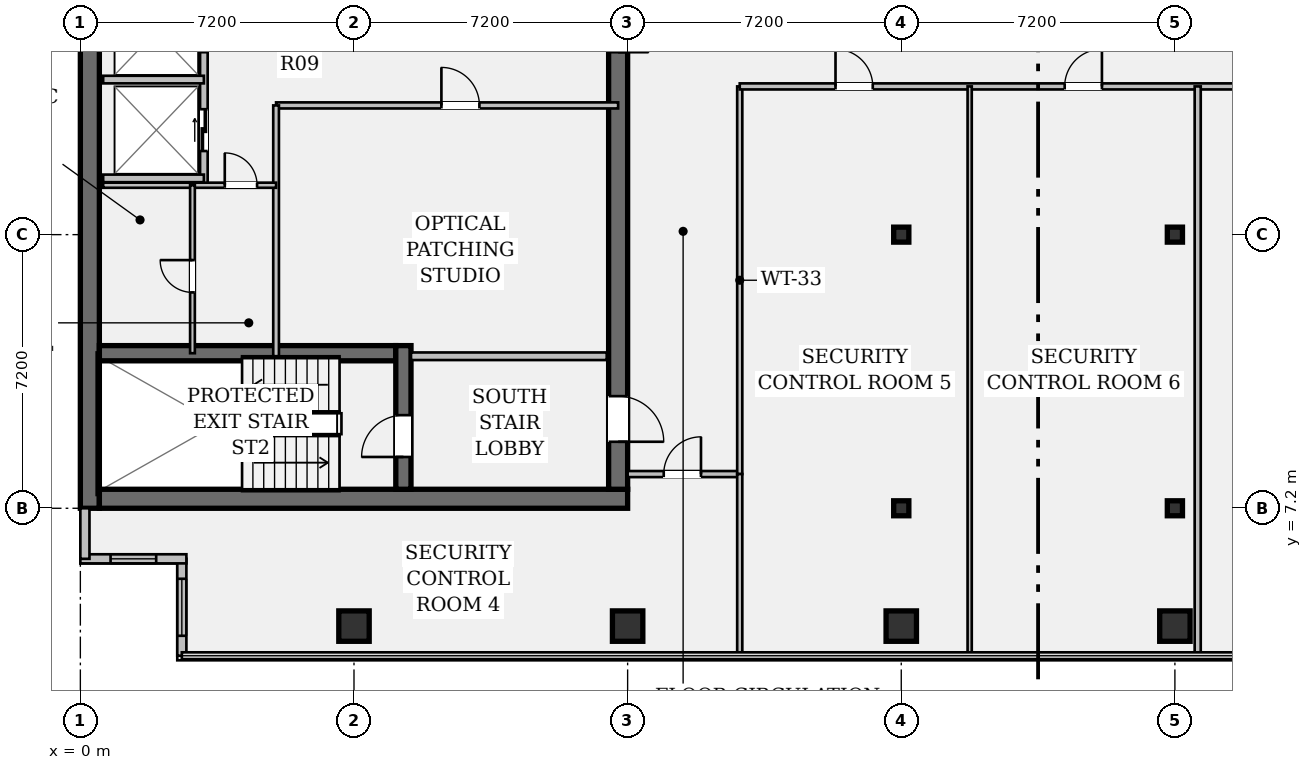
"""IFC4 building model, lengths in metres.
Left out: names, types, materials, properties, quantities, classifications, styles, units other than length and angle.
Written with IfcOpenShell. Run it as: python <this file> out.ifc"""

import sys

from ifc_helpers import new_model, si_unit, direction, frame, frame_2d, origin, origin_2d, place, context, subcontext, project, spatial, rectangle, hollow_rectangle, i_section, extrude, element, fill, save


model = new_model("IFC4")
c1 = context("Model", 3, precision=1e-05, world=origin(), true_north=direction((0.0, 1.0)))
c2 = subcontext(c1, "Body", "Model", "MODEL_VIEW")
j1 = project(units=[si_unit("LENGTHUNIT", "METRE"), si_unit("PLANEANGLEUNIT", "RADIAN")], contexts=[c1])
p1 = place(None, origin())
s1 = spatial("IfcSite", under=j1, at=p1, CompositionType="ELEMENT")
p2 = place(p1, origin())
s2 = spatial("IfcBuilding", under=s1, at=p2, CompositionType="ELEMENT")
p3 = place(p2, frame((0.0, 0.0, 190.75)))
s3 = spatial("IfcBuildingStorey", under=s2, at=p3, CompositionType="ELEMENT", Elevation=190.75)
p4 = place(p3, frame((0.25, 7.2, 0.0), z_axis=(0.0, 0.0, 1.0), x_axis=(0.0, 1.0, 0.0)))
e1 = element("IfcWall", 1, at=p4, inside=s3, PredefinedType="SHEAR", context=c2, shape_type="SweptSolid", body=[
    extrude(rectangle(XDim=28.8, YDim=0.5, at=frame_2d((14.4, 0.0))), origin(), (0.0, 0.0, 1.0), 3.24),
])
p5 = place(p3, frame((0.5, 7.45, 0.0), z_axis=(0.0, 0.0, 1.0), x_axis=(1.0, 0.0, 0.0)))
e2 = element("IfcWall", 2, at=p5, inside=s3, PredefinedType="SHEAR", context=c2, shape_type="SweptSolid", body=[
    extrude(rectangle(XDim=13.9, YDim=0.5, at=frame_2d((6.95, 0.0))), origin(), (0.0, 0.0, 1.0), 3.24),
])
p6 = place(p3, frame((14.15, 35.5, 0.0), z_axis=(0.0, 0.0, 1.0), x_axis=(0.0, -1.0, 0.0)))
e3 = element("IfcWall", 3, at=p6, inside=s3, PredefinedType="SHEAR", context=c2, shape_type="SweptSolid", body=[
    extrude(rectangle(XDim=27.8, YDim=0.5, at=frame_2d((13.9, 0.0))), origin(), (0.0, 0.0, 1.0), 3.24),
])
p7 = place(p6, frame((1.4, 0.0, 0.0)))
e4 = element("IfcOpeningElement", 4, at=p7, cuts=e3, PredefinedType="OPENING", context=c2, shape_type="SweptSolid", body=[
    extrude(rectangle(XDim=1.2, YDim=2.15, at=frame_2d((0.6, 1.075))), frame((0.0, 0.262, 0.0), z_axis=(0.0, -1.0, 0.0), x_axis=(1.0, 0.0, 0.0)), (0.0, 0.0, 1.0), 0.524),
])
p8 = place(p6, frame((25.35, 0.0, 0.0)))
e5 = element("IfcOpeningElement", 5, at=p8, cuts=e3, PredefinedType="OPENING", context=c2, shape_type="SweptSolid", body=[
    extrude(rectangle(XDim=1.2, YDim=2.15, at=frame_2d((0.6, 1.075))), frame((0.0, 0.262, 0.0), z_axis=(0.0, -1.0, 0.0), x_axis=(1.0, 0.0, 0.0)), (0.0, 0.0, 1.0), 0.524),
])
p9 = place(p6, frame((14.7, 0.0, 0.0)))
e6 = element("IfcOpeningElement", 6, at=p9, cuts=e3, PredefinedType="OPENING", context=c2, shape_type="SweptSolid", body=[
    extrude(rectangle(XDim=1.6, YDim=2.2, at=frame_2d((0.8, 1.1))), frame((0.0, 0.262, 0.0), z_axis=(0.0, -1.0, 0.0), x_axis=(1.0, 0.0, 0.0)), (0.0, 0.0, 1.0), 0.524),
])
p10 = place(p3, frame((0.5, 11.28, 0.0), z_axis=(0.0, 0.0, 1.0), x_axis=(1.0, 0.0, 0.0)))
e7 = element("IfcWall", 7, at=p10, inside=s3, PredefinedType="SHEAR", context=c2, shape_type="SweptSolid", body=[
    extrude(rectangle(XDim=7.8, YDim=0.4, at=frame_2d((3.9, 0.0))), origin(), (0.0, 0.0, 1.0), 3.24),
])
p11 = place(p3, frame((8.5, 7.7, 0.0), z_axis=(0.0, 0.0, 1.0), x_axis=(0.0, 1.0, 0.0)))
e8 = element("IfcWall", 8, at=p11, inside=s3, PredefinedType="SHEAR", context=c2, shape_type="SweptSolid", body=[
    extrude(rectangle(XDim=3.78, YDim=0.4, at=frame_2d((1.89, 0.0))), origin(), (0.0, 0.0, 1.0), 3.24),
])
p12 = place(p11, frame((0.85, 0.0, 0.0)))
e9 = element("IfcOpeningElement", 9, at=p12, cuts=e8, PredefinedType="OPENING", context=c2, shape_type="SweptSolid", body=[
    extrude(rectangle(XDim=1.1, YDim=2.15, at=frame_2d((0.55, 1.075))), frame((0.0, 0.212, 0.0), z_axis=(0.0, -1.0, 0.0), x_axis=(1.0, 0.0, 0.0)), (0.0, 0.0, 1.0), 0.424),
])
for number, where, z_axis, x_axis in (
    (10, (7.2, 4.1, 0.0), (0.0, 0.0, 1.0), (1.0, 0.0, 0.0)),
    (11, (14.4, 4.1, 0.0), (0.0, 0.0, 1.0), (1.0, 0.0, 0.0)),
    (12, (21.6, 4.1, 0.0), (0.0, 0.0, 1.0), (1.0, 0.0, 0.0)),
):
    element("IfcColumn", number, at=place(p3, frame(where, z_axis=z_axis, x_axis=x_axis)), inside=s3, PredefinedType="COLUMN", context=c2, shape_type="SweptSolid", body=[
        extrude(hollow_rectangle(XDim=0.8, YDim=0.8, WallThickness=0.05, at=origin_2d()), origin(), (0.0, 0.0, 1.0), 3.24),
    ])
for number, where, z_axis, x_axis in (
    (13, (21.6, 7.2, 0.0), (0.0, 0.0, 1.0), (1.0, 0.0, 0.0)),
    (14, (21.6, 14.4, 0.0), (0.0, 0.0, 1.0), (1.0, 0.0, 0.0)),
):
    element("IfcColumn", number, at=place(p3, frame(where, z_axis=z_axis, x_axis=x_axis)), inside=s3, PredefinedType="COLUMN", context=c2, shape_type="SweptSolid", body=[
        extrude(i_section(OverallWidth=0.399, OverallDepth=0.394, WebThickness=0.023, FlangeThickness=0.037, FilletRadius=0.018, at=origin_2d()), origin(), (0.0, 0.0, 1.0), 3.24),
    ])
p13 = place(p3, frame((28.8, 4.1, 0.0), z_axis=(0.0, 0.0, 1.0), x_axis=(1.0, 0.0, 0.0)))
e15 = element("IfcColumn", 15, at=p13, inside=s3, PredefinedType="COLUMN", context=c2, shape_type="SweptSolid", body=[
    extrude(hollow_rectangle(XDim=0.8, YDim=0.8, WallThickness=0.05, at=origin_2d()), origin(), (0.0, 0.0, 1.0), 3.24),
])
for number, where, z_axis, x_axis in (
    (16, (28.8, 7.2, 0.0), (0.0, 0.0, 1.0), (1.0, 0.0, 0.0)),
    (17, (28.8, 14.4, 0.0), (0.0, 0.0, 1.0), (1.0, 0.0, 0.0)),
):
    element("IfcColumn", number, at=place(p3, frame(where, z_axis=z_axis, x_axis=x_axis)), inside=s3, PredefinedType="COLUMN", context=c2, shape_type="SweptSolid", body=[
        extrude(i_section(OverallWidth=0.399, OverallDepth=0.394, WebThickness=0.023, FlangeThickness=0.037, FilletRadius=0.018, at=origin_2d()), origin(), (0.0, 0.0, 1.0), 3.24),
    ])
p14 = place(p3, frame((2.67, 3.32, 0.0), z_axis=(0.0, 0.0, 1.0), x_axis=(0.0, 1.0, 0.0)))
e18 = element("IfcWall", 18, at=p14, inside=s3, PredefinedType="STANDARD", context=c2, shape_type="SweptSolid", body=[
    extrude(rectangle(XDim=2.55, YDim=0.24, at=frame_2d((1.275, 0.0))), origin(), (0.0, 0.0, 1.0), 3.24),
])
p15 = place(p14, frame((0.525, 0.0, 0.95)))
e19 = element("IfcOpeningElement", 19, at=p15, cuts=e18, PredefinedType="OPENING", context=c2, shape_type="SweptSolid", body=[
    extrude(rectangle(XDim=1.5, YDim=1.8, at=frame_2d((0.75, 0.9))), frame((0.0, 0.132, 0.0), z_axis=(0.0, -1.0, 0.0), x_axis=(1.0, 0.0, 0.0)), (0.0, 0.0, 1.0), 0.264),
])
p16 = place(p3, frame((2.79, 5.87, 0.0), z_axis=(0.0, 0.0, 1.0), x_axis=(-1.0, 0.0, 0.0)))
e20 = element("IfcWall", 20, at=p16, inside=s3, PredefinedType="STANDARD", context=c2, shape_type="SweptSolid", body=[
    extrude(rectangle(XDim=2.79, YDim=0.24, at=frame_2d((1.395, 0.0))), origin(), (0.0, 0.0, 1.0), 3.24),
])
p17 = place(p16, frame((0.795, 0.0, 0.95)))
e21 = element("IfcOpeningElement", 21, at=p17, cuts=e20, PredefinedType="OPENING", context=c2, shape_type="SweptSolid", body=[
    extrude(rectangle(XDim=1.2, YDim=1.8, at=frame_2d((0.6, 0.9))), frame((0.0, 0.132, 0.0), z_axis=(0.0, -1.0, 0.0), x_axis=(1.0, 0.0, 0.0)), (0.0, 0.0, 1.0), 0.264),
])
p18 = place(p3, frame((0.12, 5.87, 0.0), z_axis=(0.0, 0.0, 1.0), x_axis=(0.0, 1.0, 0.0)))
e22 = element("IfcWall", 22, at=p18, inside=s3, PredefinedType="STANDARD", context=c2, shape_type="SweptSolid", body=[
    extrude(rectangle(XDim=1.33, YDim=0.24, at=frame_2d((0.665, 0.0))), origin(), (0.0, 0.0, 1.0), 3.24),
])
p19 = place(p3, frame((8.7, 11.2, 0.0), z_axis=(0.0, 0.0, 1.0), x_axis=(1.0, 0.0, 0.0)))
e23 = element("IfcWall", 23, at=p19, inside=s3, PredefinedType="PARTITIONING", context=c2, shape_type="SweptSolid", body=[
    extrude(rectangle(XDim=5.15, YDim=0.2, at=frame_2d((2.575, 0.0))), origin(), (0.0, 0.0, 1.0), 3.24),
])
p20 = place(p3, frame((3.25, 15.7, 0.0), z_axis=(0.0, 0.0, 1.0), x_axis=(0.0, 1.0, 0.0)))
e24 = element("IfcWall", 24, at=p20, inside=s3, PredefinedType="PARTITIONING", context=c2, shape_type="SweptSolid", body=[
    extrude(rectangle(XDim=13.08, YDim=0.2, at=frame_2d((6.54, 0.0))), origin(), (0.0, 0.0, 1.0), 3.24),
])
p21 = place(p20, frame((0.9, 0.0, 0.0)))
e25 = element("IfcOpeningElement", 25, at=p21, cuts=e24, PredefinedType="OPENING", context=c2, shape_type="SweptSolid", body=[
    extrude(rectangle(XDim=1.1, YDim=2.2, at=frame_2d((0.55, 1.1))), frame((0.0, 0.112, 0.0), z_axis=(0.0, -1.0, 0.0), x_axis=(1.0, 0.0, 0.0)), (0.0, 0.0, 1.0), 0.224),
])
p22 = place(p20, frame((3.5, 0.0, 0.0)))
e26 = element("IfcOpeningElement", 26, at=p22, cuts=e24, PredefinedType="OPENING", context=c2, shape_type="SweptSolid", body=[
    extrude(rectangle(XDim=1.1, YDim=2.2, at=frame_2d((0.55, 1.1))), frame((0.0, 0.112, 0.0), z_axis=(0.0, -1.0, 0.0), x_axis=(1.0, 0.0, 0.0)), (0.0, 0.0, 1.0), 0.224),
])
p23 = place(p20, frame((7.2, 0.0, 0.0)))
e27 = element("IfcOpeningElement", 27, at=p23, cuts=e24, PredefinedType="OPENING", context=c2, shape_type="SweptSolid", body=[
    extrude(rectangle(XDim=1.1, YDim=2.2, at=frame_2d((0.55, 1.1))), frame((0.0, 0.112, 0.0), z_axis=(0.0, -1.0, 0.0), x_axis=(1.0, 0.0, 0.0)), (0.0, 0.0, 1.0), 0.224),
])
p24 = place(p20, frame((9.8, 0.0, 0.0)))
e28 = element("IfcOpeningElement", 28, at=p24, cuts=e24, PredefinedType="OPENING", context=c2, shape_type="SweptSolid", body=[
    extrude(rectangle(XDim=1.1, YDim=2.2, at=frame_2d((0.55, 1.1))), frame((0.0, 0.112, 0.0), z_axis=(0.0, -1.0, 0.0), x_axis=(1.0, 0.0, 0.0)), (0.0, 0.0, 1.0), 0.224),
])
for number, where, z_axis, x_axis in (
    (29, (0.6, 15.88, 0.0), (0.0, 0.0, 1.0), (1.0, 0.0, 0.0)),
    (30, (0.6, 18.48, 0.0), (0.0, 0.0, 1.0), (1.0, 0.0, 0.0)),
):
    element("IfcWall", number, at=place(p3, frame(where, z_axis=z_axis, x_axis=x_axis)), inside=s3, PredefinedType="PARTITIONING", context=c2, shape_type="SweptSolid", body=[
        extrude(rectangle(XDim=2.65, YDim=0.2, at=frame_2d((1.325, 0.0))), origin(), (0.0, 0.0, 1.0), 3.24),
    ])
p25 = place(p3, frame((5.15, 17.8, 0.0), z_axis=(0.0, 0.0, 1.0), x_axis=(1.0, 0.0, 0.0)))
e31 = element("IfcWall", 31, at=p25, inside=s3, PredefinedType="PARTITIONING", context=c2, shape_type="SweptSolid", body=[
    extrude(rectangle(XDim=9.0, YDim=0.16, at=frame_2d((4.5, 0.0))), origin(), (0.0, 0.0, 1.0), 3.24),
])
p26 = place(p25, frame((4.35, 0.0, 0.0)))
e32 = element("IfcOpeningElement", 32, at=p26, cuts=e31, PredefinedType="OPENING", context=c2, shape_type="SweptSolid", body=[
    extrude(rectangle(XDim=1.0, YDim=2.15, at=frame_2d((0.5, 1.075))), frame((0.0, 0.092, 0.0), z_axis=(0.0, -1.0, 0.0), x_axis=(1.0, 0.0, 0.0)), (0.0, 0.0, 1.0), 0.184),
])
p27 = place(p3, frame((5.15, 11.2, 0.0), z_axis=(0.0, 0.0, 1.0), x_axis=(0.0, 1.0, 0.0)))
e33 = element("IfcWall", 33, at=p27, inside=s3, PredefinedType="PARTITIONING", context=c2, shape_type="SweptSolid", body=[
    extrude(rectangle(XDim=6.6, YDim=0.15, at=frame_2d((3.3, 0.0))), origin(), (0.0, 0.0, 1.0), 3.24),
])
p28 = place(p3, frame((0.6, 15.7, 0.0), z_axis=(0.0, 0.0, 1.0), x_axis=(1.0, 0.0, 0.0)))
e34 = element("IfcWall", 34, at=p28, inside=s3, PredefinedType="PARTITIONING", context=c2, shape_type="SweptSolid", body=[
    extrude(rectangle(XDim=4.55, YDim=0.135, at=frame_2d((2.275, 0.0))), origin(), (0.0, 0.0, 1.0), 3.24),
])
p29 = place(p28, frame((3.2, 0.0, 0.0)))
e35 = element("IfcOpeningElement", 35, at=p29, cuts=e34, PredefinedType="OPENING", context=c2, shape_type="SweptSolid", body=[
    extrude(rectangle(XDim=0.85, YDim=2.15, at=frame_2d((0.425, 1.075))), frame((0.0, 0.08, 0.0), z_axis=(0.0, -1.0, 0.0), x_axis=(1.0, 0.0, 0.0)), (0.0, 0.0, 1.0), 0.159),
])
p30 = place(p3, frame((2.95, 11.28, 0.0), z_axis=(0.0, 0.0, 1.0), x_axis=(0.0, 1.0, 0.0)))
e36 = element("IfcWall", 36, at=p30, inside=s3, PredefinedType="PARTITIONING", context=c2, shape_type="SweptSolid", body=[
    extrude(rectangle(XDim=4.42, YDim=0.125, at=frame_2d((2.21, 0.0))), origin(), (0.0, 0.0, 1.0), 3.24),
])
p31 = place(p30, frame((1.6, 0.0, 0.0)))
e37 = element("IfcOpeningElement", 37, at=p31, cuts=e36, PredefinedType="OPENING", context=c2, shape_type="SweptSolid", body=[
    extrude(rectangle(XDim=0.85, YDim=2.15, at=frame_2d((0.425, 1.075))), frame((0.0, 0.074, 0.0), z_axis=(0.0, -1.0, 0.0), x_axis=(1.0, 0.0, 0.0)), (0.0, 0.0, 1.0), 0.149),
])
p32 = place(p3, frame((14.4, 8.1, 0.0), z_axis=(0.0, 0.0, 1.0), x_axis=(1.0, 0.0, 0.0)))
e38 = element("IfcWall", 38, at=p32, inside=s3, PredefinedType="PARTITIONING", context=c2, shape_type="SweptSolid", body=[
    extrude(rectangle(XDim=2.95, YDim=0.16, at=frame_2d((1.475, 0.0))), origin(), (0.0, 0.0, 1.0), 2.808),
])
p33 = place(p32, frame((0.95, 0.0, 0.0)))
e39 = element("IfcOpeningElement", 39, at=p33, cuts=e38, PredefinedType="OPENING", context=c2, shape_type="SweptSolid", body=[
    extrude(rectangle(XDim=0.98, YDim=2.15, at=frame_2d((0.49, 1.075))), frame((0.0, 0.092, 0.0), z_axis=(0.0, -1.0, 0.0), x_axis=(1.0, 0.0, 0.0)), (0.0, 0.0, 1.0), 0.184),
])
p34 = place(p3, frame((17.35, 8.1, 0.0), z_axis=(0.0, 0.0, 1.0), x_axis=(0.0, 1.0, 0.0)))
e40 = element("IfcWall", 40, at=p34, inside=s3, PredefinedType="PARTITIONING", context=c2, shape_type="SweptSolid", body=[
    extrude(rectangle(XDim=10.2, YDim=0.135, at=frame_2d((5.1, 0.0))), origin(), (0.0, 0.0, 1.0), 2.603),
])
p35 = place(p3, frame((17.35, 18.3, 0.0), z_axis=(0.0, 0.0, 1.0), x_axis=(1.0, 0.0, 0.0)))
e41 = element("IfcWall", 41, at=p35, inside=s3, PredefinedType="PARTITIONING", context=c2, shape_type="SweptSolid", body=[
    extrude(rectangle(XDim=16.2, YDim=0.16, at=frame_2d((8.1, 0.0))), origin(), (0.0, 0.0, 1.0), 2.603),
])
p36 = place(p35, frame((2.52, 0.0, 0.0)))
e42 = element("IfcOpeningElement", 42, at=p36, cuts=e41, PredefinedType="OPENING", context=c2, shape_type="SweptSolid", body=[
    extrude(rectangle(XDim=0.98, YDim=2.15, at=frame_2d((0.49, 1.075))), frame((0.0, 0.092, 0.0), z_axis=(0.0, -1.0, 0.0), x_axis=(1.0, 0.0, 0.0)), (0.0, 0.0, 1.0), 0.184),
])
p37 = place(p35, frame((8.55, 0.0, 0.0)))
e43 = element("IfcOpeningElement", 43, at=p37, cuts=e41, PredefinedType="OPENING", context=c2, shape_type="SweptSolid", body=[
    extrude(rectangle(XDim=0.98, YDim=2.15, at=frame_2d((0.49, 1.075))), frame((0.0, 0.092, 0.0), z_axis=(0.0, -1.0, 0.0), x_axis=(1.0, 0.0, 0.0)), (0.0, 0.0, 1.0), 0.184),
])
p38 = place(p35, frame((13.62, 0.0, 0.0)))
e44 = element("IfcOpeningElement", 44, at=p38, cuts=e41, PredefinedType="OPENING", context=c2, shape_type="SweptSolid", body=[
    extrude(rectangle(XDim=0.98, YDim=2.15, at=frame_2d((0.49, 1.075))), frame((0.0, 0.092, 0.0), z_axis=(0.0, -1.0, 0.0), x_axis=(1.0, 0.0, 0.0)), (0.0, 0.0, 1.0), 0.184),
])
p39 = place(p3, frame((17.35, 3.32, 0.0), z_axis=(0.0, 0.0, 1.0), x_axis=(0.0, 1.0, 0.0)))
e45 = element("IfcWall", 45, at=p39, inside=s3, PredefinedType="PARTITIONING", context=c2, shape_type="SweptSolid", body=[
    extrude(rectangle(XDim=4.78, YDim=0.135, at=frame_2d((2.39, 0.0))), origin(), (0.0, 0.0, 1.0), 2.603),
])
p40 = place(p3, frame((23.4, 3.32, 0.0), z_axis=(0.0, 0.0, 1.0), x_axis=(0.0, 1.0, 0.0)))
e46 = element("IfcWall", 46, at=p40, inside=s3, PredefinedType="PARTITIONING", context=c2, shape_type="SweptSolid", body=[
    extrude(rectangle(XDim=14.98, YDim=0.11, at=frame_2d((7.49, 0.0))), origin(), (0.0, 0.0, 1.0), 2.603),
])
p41 = place(p3, frame((29.4, 3.32, 0.0), z_axis=(0.0, 0.0, 1.0), x_axis=(0.0, 1.0, 0.0)))
e47 = element("IfcWall", 47, at=p41, inside=s3, PredefinedType="PARTITIONING", context=c2, shape_type="SweptSolid", body=[
    extrude(rectangle(XDim=14.98, YDim=0.16, at=frame_2d((7.49, 0.0))), origin(), (0.0, 0.0, 1.0), 2.603),
])
p42 = place(p15, origin())
e48 = element("IfcWindow", 48, at=p42, inside=s3, PartitioningType="SINGLE_PANEL", PredefinedType="WINDOW", context=c2, shape_type="SweptSolid", body=[
    extrude(rectangle(XDim=1.5, YDim=1.8, at=frame_2d((0.75, 0.9))), frame((0.0, 0.03, 0.0), z_axis=(0.0, -1.0, 0.0), x_axis=(1.0, 0.0, 0.0)), (0.0, 0.0, 1.0), 0.06),
])
fill(e19, e48)
p43 = place(p17, origin())
e49 = element("IfcWindow", 49, at=p43, inside=s3, PartitioningType="SINGLE_PANEL", PredefinedType="WINDOW", context=c2, shape_type="SweptSolid", body=[
    extrude(rectangle(XDim=1.2, YDim=1.8, at=frame_2d((0.6, 0.9))), frame((0.0, 0.03, 0.0), z_axis=(0.0, -1.0, 0.0), x_axis=(1.0, 0.0, 0.0)), (0.0, 0.0, 1.0), 0.06),
])
fill(e21, e49)
p44 = place(p12, origin())
e50 = element("IfcDoor", 50, at=p44, inside=s3, OperationType="SINGLE_SWING_LEFT", PredefinedType="DOOR", context=c2, shape_type="SweptSolid", body=[
    extrude(rectangle(XDim=1.1, YDim=2.15, at=frame_2d((0.55, 1.075))), frame((0.0, 0.025, 0.0), z_axis=(0.0, -1.0, 0.0), x_axis=(1.0, 0.0, 0.0)), (0.0, 0.0, 1.0), 0.05),
])
fill(e9, e50)
p45 = place(p8, origin())
e51 = element("IfcDoor", 51, at=p45, inside=s3, OperationType="SINGLE_SWING_RIGHT", PredefinedType="DOOR", context=c2, shape_type="SweptSolid", body=[
    extrude(rectangle(XDim=1.2, YDim=2.15, at=frame_2d((0.6, 1.075))), frame((0.0, 0.025, 0.0), z_axis=(0.0, -1.0, 0.0), x_axis=(1.0, 0.0, 0.0)), (0.0, 0.0, 1.0), 0.05),
])
fill(e5, e51)
p46 = place(p21, origin())
e52 = element("IfcDoor", 52, at=p46, inside=s3, OperationType="DOUBLE_DOOR_SLIDING", PredefinedType="DOOR", context=c2, shape_type="SweptSolid", body=[
    extrude(rectangle(XDim=1.1, YDim=2.2, at=frame_2d((0.55, 1.1))), frame((0.0, 0.025, 0.0), z_axis=(0.0, -1.0, 0.0), x_axis=(1.0, 0.0, 0.0)), (0.0, 0.0, 1.0), 0.05),
])
fill(e25, e52)
p47 = place(p26, origin())
e53 = element("IfcDoor", 53, at=p47, inside=s3, OperationType="SINGLE_SWING_LEFT", PredefinedType="DOOR", context=c2, shape_type="SweptSolid", body=[
    extrude(rectangle(XDim=1.0, YDim=2.15, at=frame_2d((0.5, 1.075))), frame((0.0, 0.025, 0.0), z_axis=(0.0, -1.0, 0.0), x_axis=(1.0, 0.0, 0.0)), (0.0, 0.0, 1.0), 0.05),
])
fill(e32, e53)
p48 = place(p29, origin())
e54 = element("IfcDoor", 54, at=p48, inside=s3, OperationType="SINGLE_SWING_LEFT", PredefinedType="DOOR", context=c2, shape_type="SweptSolid", body=[
    extrude(rectangle(XDim=0.85, YDim=2.15, at=frame_2d((0.425, 1.075))), frame((0.0, 0.025, 0.0), z_axis=(0.0, -1.0, 0.0), x_axis=(1.0, 0.0, 0.0)), (0.0, 0.0, 1.0), 0.05),
])
fill(e35, e54)
p49 = place(p31, origin())
e55 = element("IfcDoor", 55, at=p49, inside=s3, OperationType="SINGLE_SWING_RIGHT", PredefinedType="DOOR", context=c2, shape_type="SweptSolid", body=[
    extrude(rectangle(XDim=0.85, YDim=2.15, at=frame_2d((0.425, 1.075))), frame((0.0, 0.025, 0.0), z_axis=(0.0, -1.0, 0.0), x_axis=(1.0, 0.0, 0.0)), (0.0, 0.0, 1.0), 0.05),
])
fill(e37, e55)
p50 = place(p33, origin())
e56 = element("IfcDoor", 56, at=p50, inside=s3, OperationType="SINGLE_SWING_RIGHT", PredefinedType="DOOR", context=c2, shape_type="SweptSolid", body=[
    extrude(rectangle(XDim=0.98, YDim=2.15, at=frame_2d((0.49, 1.075))), frame((0.0, 0.025, 0.0), z_axis=(0.0, -1.0, 0.0), x_axis=(1.0, 0.0, 0.0)), (0.0, 0.0, 1.0), 0.05),
])
fill(e39, e56)
p51 = place(p36, origin())
e57 = element("IfcDoor", 57, at=p51, inside=s3, OperationType="SINGLE_SWING_LEFT", PredefinedType="DOOR", context=c2, shape_type="SweptSolid", body=[
    extrude(rectangle(XDim=0.98, YDim=2.15, at=frame_2d((0.49, 1.075))), frame((0.0, 0.025, 0.0), z_axis=(0.0, -1.0, 0.0), x_axis=(1.0, 0.0, 0.0)), (0.0, 0.0, 1.0), 0.05),
])
fill(e42, e57)
p52 = place(p37, origin())
e58 = element("IfcDoor", 58, at=p52, inside=s3, OperationType="SINGLE_SWING_RIGHT", PredefinedType="DOOR", context=c2, shape_type="SweptSolid", body=[
    extrude(rectangle(XDim=0.98, YDim=2.15, at=frame_2d((0.49, 1.075))), frame((0.0, 0.025, 0.0), z_axis=(0.0, -1.0, 0.0), x_axis=(1.0, 0.0, 0.0)), (0.0, 0.0, 1.0), 0.05),
])
fill(e43, e58)
save(model, sys.argv[1])
